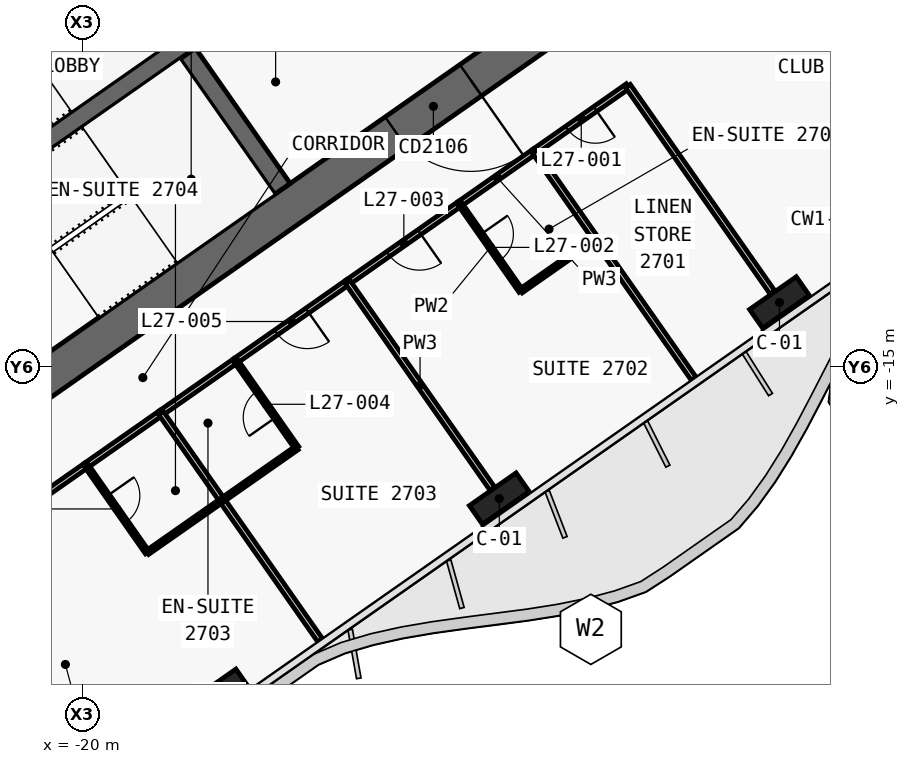
"""IFC4 building model, lengths in metres.
Left out: names, types, materials, properties, quantities, classifications, styles, units other than length and angle.
Written with IfcOpenShell. Run it as: python <this file> out.ifc"""

import sys

from ifc_helpers import new_model, si_unit, direction, frame, frame_2d, origin, origin_2d, place, context, subcontext, project, spatial, polyline, rectangle, outline, extrude, element, fill, save


model = new_model("IFC4")
c1 = context("Model", 3, precision=1e-05, world=origin(), true_north=direction((0.0, 1.0)))
c2 = subcontext(c1, "Body", "Model", "MODEL_VIEW")
j1 = project(units=[si_unit("LENGTHUNIT", "METRE"), si_unit("PLANEANGLEUNIT", "RADIAN")], contexts=[c1])
p1 = place(None, origin())
s1 = spatial("IfcSite", under=j1, at=p1, CompositionType="ELEMENT")
p2 = place(p1, origin())
s2 = spatial("IfcBuilding", under=s1, at=p2, CompositionType="ELEMENT")
p3 = place(p2, frame((0.0, 0.0, 122.9)))
s3 = spatial("IfcBuildingStorey", under=s2, at=p3, CompositionType="ELEMENT", Elevation=122.9)
p4 = place(p3, frame((0.037, 11.867, 0.0), z_axis=(0.0, 0.0, 1.0), x_axis=(-0.819155306259, -0.573571777746, 0.0)))
e1 = element("IfcWall", 1, at=p4, inside=s3, PredefinedType="SHEAR", context=c2, shape_type="SweptSolid", body=[
    extrude(outline(polyline([(33.837, 0.5), (0.7, 0.5), (0.0, -0.5), (33.837, -0.5), (33.837, 0.5)])), origin(), (0.0, 0.0, 1.0), 3.6),
])
p5 = place(p3, frame((0.037, -0.585, 0.0), z_axis=(0.0, 0.0, 1.0), x_axis=(-0.819157152511, -0.573569140985, 0.0)))
e2 = element("IfcWall", 2, at=p5, inside=s3, PredefinedType="SHEAR", context=c2, shape_type="SweptSolid", body=[
    extrude(outline(polyline([(26.695, 0.5), (0.7, 0.5), (0.0, -0.5), (26.695, -0.5), (26.695, 0.5)])), origin(), (0.0, 0.0, 1.0), 3.6),
])
p6 = place(p5, frame((2.995, 0.0, 0.0)))
e3 = element("IfcOpeningElement", 3, at=p6, cuts=e2, PredefinedType="OPENING", context=c2, shape_type="SweptSolid", body=[
    extrude(rectangle(XDim=2.4, YDim=2.1, at=frame_2d((1.2, 1.05))), frame((0.0, 0.51, 0.0), z_axis=(0.0, -1.0, 0.0), x_axis=(1.0, 0.0, 0.0)), (0.0, 0.0, 1.0), 1.02),
])
p7 = place(p5, frame((11.995, 0.0, 0.0)))
e4 = element("IfcOpeningElement", 4, at=p7, cuts=e2, PredefinedType="OPENING", context=c2, shape_type="SweptSolid", body=[
    extrude(rectangle(XDim=2.4, YDim=2.1, at=frame_2d((1.2, 1.05))), frame((0.0, 0.51, 0.0), z_axis=(0.0, -1.0, 0.0), x_axis=(1.0, 0.0, 0.0)), (0.0, 0.0, 1.0), 1.02),
])
p8 = place(p3, frame((-14.745, -10.324, 0.0), z_axis=(0.0, 0.0, 1.0), x_axis=(-0.57356780395, 0.819158088694, 0.0)))
e5 = element("IfcWall", 5, at=p8, inside=s3, PredefinedType="SHEAR", context=c2, shape_type="SweptSolid", body=[
    extrude(outline(polyline([(4.35, 0.25), (0.0, 0.25), (0.0, -0.25), (4.35, -0.25), (4.35, 0.25)])), origin(), (0.0, 0.0, 1.0), 3.6),
])
p9 = place(p3, frame((-2.638, 3.768, 0.0), z_axis=(0.0, 0.0, 1.0), x_axis=(-0.819148977158, -0.573580816643, 0.0)))
e6 = element("IfcWall", 6, at=p9, inside=s3, PredefinedType="SHEAR", context=c2, shape_type="SweptSolid", body=[
    extrude(outline(polyline([(26.0, 0.25), (0.0, 0.25), (0.0, -0.25), (26.0, -0.25), (26.0, 0.25)])), origin(), (0.0, 0.0, 1.0), 3.6),
])
p10 = place(p9, frame((1.169, 0.0, 0.0)))
e7 = element("IfcOpeningElement", 7, at=p10, cuts=e6, PredefinedType="OPENING", context=c2, shape_type="SweptSolid", body=[
    extrude(rectangle(XDim=1.1, YDim=2.1, at=frame_2d((0.55, 1.05))), frame((0.0, 0.26, 0.0), z_axis=(0.0, -1.0, 0.0), x_axis=(1.0, 0.0, 0.0)), (0.0, 0.0, 1.0), 0.52),
])
p11 = place(p9, frame((3.206, 0.0, 0.0)))
e8 = element("IfcOpeningElement", 8, at=p11, cuts=e6, PredefinedType="OPENING", context=c2, shape_type="SweptSolid", body=[
    extrude(rectangle(XDim=1.1, YDim=2.1, at=frame_2d((0.55, 1.05))), frame((0.0, 0.26, 0.0), z_axis=(0.0, -1.0, 0.0), x_axis=(1.0, 0.0, 0.0)), (0.0, 0.0, 1.0), 0.52),
])
p12 = place(p9, frame((5.244, 0.0, 0.0)))
e9 = element("IfcOpeningElement", 9, at=p12, cuts=e6, PredefinedType="OPENING", context=c2, shape_type="SweptSolid", body=[
    extrude(rectangle(XDim=1.1, YDim=2.1, at=frame_2d((0.55, 1.05))), frame((0.0, 0.26, 0.0), z_axis=(0.0, -1.0, 0.0), x_axis=(1.0, 0.0, 0.0)), (0.0, 0.0, 1.0), 0.52),
])
p13 = place(p9, frame((7.281, 0.0, 0.0)))
e10 = element("IfcOpeningElement", 10, at=p13, cuts=e6, PredefinedType="OPENING", context=c2, shape_type="SweptSolid", body=[
    extrude(rectangle(XDim=1.1, YDim=2.1, at=frame_2d((0.55, 1.05))), frame((0.0, 0.26, 0.0), z_axis=(0.0, -1.0, 0.0), x_axis=(1.0, 0.0, 0.0)), (0.0, 0.0, 1.0), 0.52),
])
p14 = place(p9, frame((9.688, 0.0, 0.0)))
e11 = element("IfcOpeningElement", 11, at=p14, cuts=e6, PredefinedType="OPENING", context=c2, shape_type="SweptSolid", body=[
    extrude(rectangle(XDim=1.1, YDim=2.1, at=frame_2d((0.55, 1.05))), frame((0.0, 0.26, 0.0), z_axis=(0.0, -1.0, 0.0), x_axis=(1.0, 0.0, 0.0)), (0.0, 0.0, 1.0), 0.52),
])
p15 = place(p9, frame((11.863, 0.0, 0.0)))
e12 = element("IfcOpeningElement", 12, at=p15, cuts=e6, PredefinedType="OPENING", context=c2, shape_type="SweptSolid", body=[
    extrude(rectangle(XDim=1.1, YDim=2.1, at=frame_2d((0.55, 1.05))), frame((0.0, 0.26, 0.0), z_axis=(0.0, -1.0, 0.0), x_axis=(1.0, 0.0, 0.0)), (0.0, 0.0, 1.0), 0.52),
])
p16 = place(p9, frame((14.038, 0.0, 0.0)))
e13 = element("IfcOpeningElement", 13, at=p16, cuts=e6, PredefinedType="OPENING", context=c2, shape_type="SweptSolid", body=[
    extrude(rectangle(XDim=1.1, YDim=2.1, at=frame_2d((0.55, 1.05))), frame((0.0, 0.26, 0.0), z_axis=(0.0, -1.0, 0.0), x_axis=(1.0, 0.0, 0.0)), (0.0, 0.0, 1.0), 0.52),
])
p17 = place(p9, frame((16.212, 0.0, 0.0)))
e14 = element("IfcOpeningElement", 14, at=p17, cuts=e6, PredefinedType="OPENING", context=c2, shape_type="SweptSolid", body=[
    extrude(rectangle(XDim=1.1, YDim=2.1, at=frame_2d((0.55, 1.05))), frame((0.0, 0.26, 0.0), z_axis=(0.0, -1.0, 0.0), x_axis=(1.0, 0.0, 0.0)), (0.0, 0.0, 1.0), 0.52),
])
for number, where, z_axis, x_axis in (
    (15, (-1.665, -13.313, 0.0), (0.0, 0.0, 1.0), (-0.819, -0.574, 0.0)),
    (16, (-9.038, -18.475, 0.0), (0.0, 0.0, 1.0), (-0.819, -0.574, 0.0)),
    (17, (-16.41, -23.637, 0.0), (0.0, 0.0, 1.0), (-0.819, -0.574, 0.0)),
):
    element("IfcColumn", number, at=place(p3, frame(where, z_axis=z_axis, x_axis=x_axis)), inside=s3, PredefinedType="COLUMN", context=c2, shape_type="SweptSolid", body=[
        extrude(rectangle(XDim=1.5, YDim=0.6, at=origin_2d()), origin(), (0.0, 0.0, 1.0), 3.6),
    ])
p18 = place(p3, frame((-5.652, -7.62, 0.0), z_axis=(0.0, 0.0, 1.0), x_axis=(-0.819132568355, -0.573604249862, 0.0)))
e18 = element("IfcWall", 18, at=p18, inside=s3, PredefinedType="PARTITIONING", context=c2, shape_type="SweptSolid", body=[
    extrude(rectangle(XDim=3.002, YDim=0.15, at=frame_2d((1.501, 0.0))), origin(), (0.0, 0.0, 1.0), 2.6),
])
p19 = place(p18, frame((1.051, 0.0, 0.0)))
e19 = element("IfcOpeningElement", 19, at=p19, cuts=e18, PredefinedType="OPENING", context=c2, shape_type="SweptSolid", body=[
    extrude(rectangle(XDim=0.9, YDim=2.1, at=frame_2d((0.45, 1.05))), frame((0.0, 0.085, 0.0), z_axis=(0.0, -1.0, 0.0), x_axis=(1.0, 0.0, 0.0)), (0.0, 0.0, 1.0), 0.17),
])
p20 = place(p3, frame((-10.074, -10.716, 0.0), z_axis=(0.0, 0.0, 1.0), x_axis=(-0.819145961204, -0.573585123798, 0.0)))
e20 = element("IfcWall", 20, at=p20, inside=s3, PredefinedType="PARTITIONING", context=c2, shape_type="SweptSolid", body=[
    extrude(rectangle(XDim=3.603, YDim=0.15, at=frame_2d((1.802, 0.0))), origin(), (0.0, 0.0, 1.0), 2.6),
])
p21 = place(p20, frame((1.301, 0.0, 0.0)))
e21 = element("IfcOpeningElement", 21, at=p21, cuts=e20, PredefinedType="OPENING", context=c2, shape_type="SweptSolid", body=[
    extrude(rectangle(XDim=1.0, YDim=2.1, at=frame_2d((0.5, 1.05))), frame((0.0, 0.085, 0.0), z_axis=(0.0, -1.0, 0.0), x_axis=(1.0, 0.0, 0.0)), (0.0, 0.0, 1.0), 0.17),
])
p22 = place(p3, frame((-8.107, -9.339, 0.0), z_axis=(0.0, 0.0, 1.0), x_axis=(-0.819146032251, -0.573585022335, 0.0)))
e22 = element("IfcWall", 22, at=p22, inside=s3, PredefinedType="PARTITIONING", context=c2, shape_type="SweptSolid", body=[
    extrude(rectangle(XDim=2.404, YDim=0.15, at=frame_2d((1.202, 0.0))), origin(), (0.0, 0.0, 1.0), 3.32),
])
p23 = place(p3, frame((-13.022, -12.781, 0.0), z_axis=(0.0, 0.0, 1.0), x_axis=(-0.819145961204, -0.573585123798, 0.0)))
e23 = element("IfcWall", 23, at=p23, inside=s3, PredefinedType="PARTITIONING", context=c2, shape_type="SweptSolid", body=[
    extrude(rectangle(XDim=3.603, YDim=0.15, at=frame_2d((1.802, 0.0))), origin(), (0.0, 0.0, 1.0), 2.6),
])
p24 = place(p23, frame((1.302, 0.0, 0.0)))
e24 = element("IfcOpeningElement", 24, at=p24, cuts=e23, PredefinedType="OPENING", context=c2, shape_type="SweptSolid", body=[
    extrude(rectangle(XDim=1.0, YDim=2.1, at=frame_2d((0.5, 1.05))), frame((0.0, 0.085, 0.0), z_axis=(0.0, -1.0, 0.0), x_axis=(1.0, 0.0, 0.0)), (0.0, 0.0, 1.0), 0.17),
])
p25 = place(p3, frame((-15.971, -14.846, 0.0), z_axis=(0.0, 0.0, 1.0), x_axis=(-0.81922714955, -0.573469159974, 0.0)))
e25 = element("IfcWall", 25, at=p25, inside=s3, PredefinedType="PARTITIONING", context=c2, shape_type="SweptSolid", body=[
    extrude(rectangle(XDim=2.404, YDim=0.15, at=frame_2d((1.202, 0.0))), origin(), (0.0, 0.0, 1.0), 3.32),
])
p26 = place(p3, frame((-19.904, -17.599, 0.0), z_axis=(0.0, 0.0, 1.0), x_axis=(-0.819153746897, -0.573574004767, 0.0)))
e26 = element("IfcWall", 26, at=p26, inside=s3, PredefinedType="PARTITIONING", context=c2, shape_type="SweptSolid", body=[
    extrude(rectangle(XDim=6.603, YDim=0.15, at=frame_2d((3.302, 0.0))), origin(), (0.0, 0.0, 1.0), 2.6),
])
p27 = place(p26, frame((2.801, 0.0, 0.0)))
e27 = element("IfcOpeningElement", 27, at=p27, cuts=e26, PredefinedType="OPENING", context=c2, shape_type="SweptSolid", body=[
    extrude(rectangle(XDim=1.0, YDim=2.1, at=frame_2d((0.5, 1.05))), frame((0.0, 0.085, 0.0), z_axis=(0.0, -1.0, 0.0), x_axis=(1.0, 0.0, 0.0)), (0.0, 0.0, 1.0), 0.17),
])
p28 = place(p3, frame((-17.937, -16.222, 0.0), z_axis=(0.0, 0.0, 1.0), x_axis=(-0.819146032251, -0.573585022335, 0.0)))
e28 = element("IfcWall", 28, at=p28, inside=s3, PredefinedType="PARTITIONING", context=c2, shape_type="SweptSolid", body=[
    extrude(rectangle(XDim=2.404, YDim=0.15, at=frame_2d((1.202, 0.0))), origin(), (0.0, 0.0, 1.0), 3.32),
])
p29 = place(p3, frame((-1.849, -13.051, 0.0), z_axis=(0.0, 0.0, 1.0), x_axis=(-0.573575988258, 0.819152358047, 0.0)))
e29 = element("IfcWall", 29, at=p29, inside=s3, PredefinedType="PARTITIONING", context=c2, shape_type="SweptSolid", body=[
    extrude(rectangle(XDim=6.632, YDim=0.15, at=frame_2d((3.316, 0.0))), origin(), (0.0, 0.0, 1.0), 2.6),
])
p30 = place(p3, frame((-3.922, -15.32, 0.0), z_axis=(0.0, 0.0, 1.0), x_axis=(-0.573556991349, 0.819165659482, 0.0)))
e30 = element("IfcWall", 30, at=p30, inside=s3, PredefinedType="PARTITIONING", context=c2, shape_type="SweptSolid", body=[
    extrude(rectangle(XDim=4.501, YDim=0.15, at=frame_2d((2.25, 0.0))), origin(), (0.0, 0.0, 1.0), 2.5),
])
p31 = place(p3, frame((-6.502, -11.635, 0.0), z_axis=(0.0, 0.0, 1.0), x_axis=(-0.573596837309, 0.819137759006, 0.0)))
e31 = element("IfcWall", 31, at=p31, inside=s3, PredefinedType="PARTITIONING", context=c2, shape_type="SweptSolid", body=[
    extrude(rectangle(XDim=2.802, YDim=0.15, at=frame_2d((1.401, 0.0))), origin(), (0.0, 0.0, 1.0), 3.32),
])
p32 = place(p3, frame((-10.076, -10.718, 0.0), z_axis=(0.0, 0.0, 1.0), x_axis=(0.573550118428, -0.819170471667, 0.0)))
e32 = element("IfcWall", 32, at=p32, inside=s3, PredefinedType="PARTITIONING", context=c2, shape_type="SweptSolid", body=[
    extrude(rectangle(XDim=2.8, YDim=0.12, at=frame_2d((1.4, 0.0))), origin(), (0.0, 0.0, 1.0), 3.32),
])
p33 = place(p32, frame((0.975, 0.0, 0.0)))
e33 = element("IfcOpeningElement", 33, at=p33, cuts=e32, PredefinedType="OPENING", context=c2, shape_type="SweptSolid", body=[
    extrude(rectangle(XDim=0.85, YDim=2.05, at=frame_2d((0.425, 1.025))), frame((0.0, 0.07, 0.0), z_axis=(0.0, -1.0, 0.0), x_axis=(1.0, 0.0, 0.0)), (0.0, 0.0, 1.0), 0.14),
])
p34 = place(p3, frame((-8.469, -13.011, 0.0), z_axis=(0.0, 0.0, 1.0), x_axis=(0.819141114317, 0.573592045652, 0.0)))
e34 = element("IfcWall", 34, at=p34, inside=s3, PredefinedType="PARTITIONING", context=c2, shape_type="SweptSolid", body=[
    extrude(rectangle(XDim=2.4, YDim=0.12, at=frame_2d((1.2, 0.0))), origin(), (0.0, 0.0, 1.0), 3.32),
])
p35 = place(p3, frame((-9.221, -18.213, 0.0), z_axis=(0.0, 0.0, 1.0), x_axis=(-0.573556251799, 0.819166177294, 0.0)))
e35 = element("IfcWall", 35, at=p35, inside=s3, PredefinedType="PARTITIONING", context=c2, shape_type="SweptSolid", body=[
    extrude(rectangle(XDim=6.63, YDim=0.15, at=frame_2d((3.315, 0.0))), origin(), (0.0, 0.0, 1.0), 2.6),
])
p36 = place(p3, frame((-16.332, -18.518, 0.0), z_axis=(0.0, 0.0, 1.0), x_axis=(0.819155442668, 0.573571582932, 0.0)))
e36 = element("IfcWall", 36, at=p36, inside=s3, PredefinedType="PARTITIONING", context=c2, shape_type="SweptSolid", body=[
    extrude(rectangle(XDim=2.4, YDim=0.12, at=frame_2d((1.2, 0.0))), origin(), (0.0, 0.0, 1.0), 3.32),
])
p37 = place(p3, frame((-14.366, -17.14, 0.0), z_axis=(0.0, 0.0, 1.0), x_axis=(-0.573550118428, 0.819170471667, 0.0)))
e37 = element("IfcWall", 37, at=p37, inside=s3, PredefinedType="PARTITIONING", context=c2, shape_type="SweptSolid", body=[
    extrude(rectangle(XDim=2.8, YDim=0.12, at=frame_2d((1.4, 0.0))), origin(), (0.0, 0.0, 1.0), 3.32),
])
p38 = place(p37, frame((0.975, 0.0, 0.0)))
e38 = element("IfcOpeningElement", 38, at=p38, cuts=e37, PredefinedType="OPENING", context=c2, shape_type="SweptSolid", body=[
    extrude(rectangle(XDim=0.85, YDim=2.05, at=frame_2d((0.425, 1.025))), frame((0.0, 0.07, 0.0), z_axis=(0.0, -1.0, 0.0), x_axis=(1.0, 0.0, 0.0)), (0.0, 0.0, 1.0), 0.14),
])
p39 = place(p3, frame((-13.752, -22.203, 0.0), z_axis=(0.0, 0.0, 1.0), x_axis=(-0.573564311442, 0.819160534108, 0.0)))
e39 = element("IfcWall", 39, at=p39, inside=s3, PredefinedType="PARTITIONING", context=c2, shape_type="SweptSolid", body=[
    extrude(rectangle(XDim=4.499, YDim=0.15, at=frame_2d((2.25, 0.0))), origin(), (0.0, 0.0, 1.0), 2.5),
])
p40 = place(p3, frame((-16.333, -18.517, 0.0), z_axis=(0.0, 0.0, 1.0), x_axis=(-0.573591086599, 0.819141785879, 0.0)))
e40 = element("IfcWall", 40, at=p40, inside=s3, PredefinedType="PARTITIONING", context=c2, shape_type="SweptSolid", body=[
    extrude(rectangle(XDim=2.8, YDim=0.15, at=frame_2d((1.4, 0.0))), origin(), (0.0, 0.0, 1.0), 3.32),
])
p41 = place(p3, frame((-19.906, -17.6, 0.0), z_axis=(0.0, 0.0, 1.0), x_axis=(0.573550118428, -0.819170471667, 0.0)))
e41 = element("IfcWall", 41, at=p41, inside=s3, PredefinedType="PARTITIONING", context=c2, shape_type="SweptSolid", body=[
    extrude(rectangle(XDim=2.8, YDim=0.12, at=frame_2d((1.4, 0.0))), origin(), (0.0, 0.0, 1.0), 3.32),
])
p42 = place(p41, frame((0.975, 0.0, 0.0)))
e42 = element("IfcOpeningElement", 42, at=p42, cuts=e41, PredefinedType="OPENING", context=c2, shape_type="SweptSolid", body=[
    extrude(rectangle(XDim=0.85, YDim=2.05, at=frame_2d((0.425, 1.025))), frame((0.0, 0.07, 0.0), z_axis=(0.0, -1.0, 0.0), x_axis=(1.0, 0.0, 0.0)), (0.0, 0.0, 1.0), 0.14),
])
p43 = place(p3, frame((-18.298, -19.894, 0.0), z_axis=(0.0, 0.0, 1.0), x_axis=(0.819141114317, 0.573592045652, 0.0)))
e43 = element("IfcWall", 43, at=p43, inside=s3, PredefinedType="PARTITIONING", context=c2, shape_type="SweptSolid", body=[
    extrude(rectangle(XDim=2.4, YDim=0.12, at=frame_2d((1.2, 0.0))), origin(), (0.0, 0.0, 1.0), 3.32),
])
p44 = place(p7, origin())
e44 = element("IfcDoor", 44, at=p44, inside=s3, OperationType="DOUBLE_DOOR_SINGLE_SWING", PredefinedType="DOOR", context=c2, shape_type="SweptSolid", body=[
    extrude(rectangle(XDim=2.4, YDim=2.1, at=frame_2d((1.2, 1.05))), frame((0.0, 0.025, 0.0), z_axis=(0.0, -1.0, 0.0), x_axis=(1.0, 0.0, 0.0)), (0.0, 0.0, 1.0), 0.05),
])
fill(e4, e44)
p45 = place(p19, origin())
e45 = element("IfcDoor", 45, at=p45, inside=s3, OperationType="SINGLE_SWING_RIGHT", PredefinedType="DOOR", context=c2, shape_type="SweptSolid", body=[
    extrude(rectangle(XDim=0.9, YDim=2.1, at=frame_2d((0.45, 1.05))), frame((0.0, 0.025, 0.0), z_axis=(0.0, -1.0, 0.0), x_axis=(1.0, 0.0, 0.0)), (0.0, 0.0, 1.0), 0.05),
])
fill(e19, e45)
p46 = place(p33, origin())
e46 = element("IfcDoor", 46, at=p46, inside=s3, OperationType="SINGLE_SWING_RIGHT", PredefinedType="DOOR", context=c2, shape_type="SweptSolid", body=[
    extrude(rectangle(XDim=0.85, YDim=2.05, at=frame_2d((0.425, 1.025))), frame((0.0, 0.025, 0.0), z_axis=(0.0, -1.0, 0.0), x_axis=(1.0, 0.0, 0.0)), (0.0, 0.0, 1.0), 0.05),
])
fill(e33, e46)
p47 = place(p21, origin())
e47 = element("IfcDoor", 47, at=p47, inside=s3, OperationType="SINGLE_SWING_LEFT", PredefinedType="DOOR", context=c2, shape_type="SweptSolid", body=[
    extrude(rectangle(XDim=1.0, YDim=2.1, at=frame_2d((0.5, 1.05))), frame((0.0, 0.025, 0.0), z_axis=(0.0, -1.0, 0.0), x_axis=(1.0, 0.0, 0.0)), (0.0, 0.0, 1.0), 0.05),
])
fill(e21, e47)
p48 = place(p38, origin())
e48 = element("IfcDoor", 48, at=p48, inside=s3, OperationType="SINGLE_SWING_RIGHT", PredefinedType="DOOR", context=c2, shape_type="SweptSolid", body=[
    extrude(rectangle(XDim=0.85, YDim=2.05, at=frame_2d((0.425, 1.025))), frame((0.0, 0.025, 0.0), z_axis=(0.0, -1.0, 0.0), x_axis=(1.0, 0.0, 0.0)), (0.0, 0.0, 1.0), 0.05),
])
fill(e38, e48)
p49 = place(p24, origin())
e49 = element("IfcDoor", 49, at=p49, inside=s3, OperationType="SINGLE_SWING_LEFT", PredefinedType="DOOR", context=c2, shape_type="SweptSolid", body=[
    extrude(rectangle(XDim=1.0, YDim=2.1, at=frame_2d((0.5, 1.05))), frame((0.0, 0.025, 0.0), z_axis=(0.0, -1.0, 0.0), x_axis=(1.0, 0.0, 0.0)), (0.0, 0.0, 1.0), 0.05),
])
fill(e24, e49)
p50 = place(p42, origin())
e50 = element("IfcDoor", 50, at=p50, inside=s3, OperationType="SINGLE_SWING_RIGHT", PredefinedType="DOOR", context=c2, shape_type="SweptSolid", body=[
    extrude(rectangle(XDim=0.85, YDim=2.05, at=frame_2d((0.425, 1.025))), frame((0.0, 0.025, 0.0), z_axis=(0.0, -1.0, 0.0), x_axis=(1.0, 0.0, 0.0)), (0.0, 0.0, 1.0), 0.05),
])
fill(e42, e50)
save(model, sys.argv[1])
